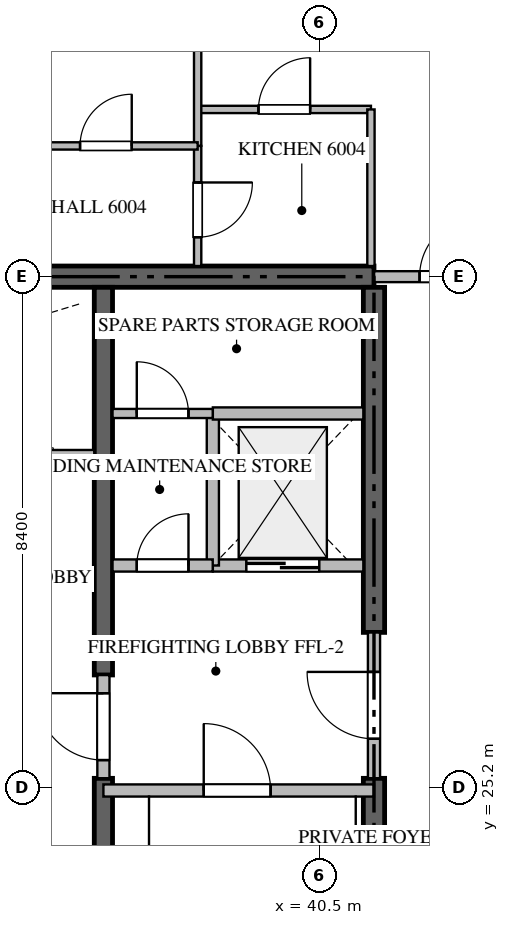
"""IFC4 building model, lengths in metres.
Left out: names, types, materials, properties, quantities, classifications, styles, units other than length and angle.
Written with IfcOpenShell. Run it as: python <this file> out.ifc"""

import sys

from ifc_helpers import new_model, si_unit, direction, frame, frame_2d, origin, place, context, subcontext, project, spatial, rectangle, extrude, source, transform, mapped, element, fill, save


model = new_model("IFC4")
c1 = context("Model", 3, precision=1e-05, world=origin(), true_north=direction((0.0, 1.0)))
c2 = subcontext(c1, "Body", "Model", "MODEL_VIEW")
j1 = project(units=[si_unit("LENGTHUNIT", "METRE"), si_unit("PLANEANGLEUNIT", "RADIAN")], contexts=[c1])
p1 = place(None, origin())
s1 = spatial("IfcSite", under=j1, at=p1, CompositionType="ELEMENT")
p2 = place(p1, origin())
s2 = spatial("IfcBuilding", under=s1, at=p2, CompositionType="ELEMENT")
p3 = place(p2, frame((0.0, 0.0, 241.25)))
s3 = spatial("IfcBuildingStorey", under=s2, at=p3, CompositionType="ELEMENT", Elevation=241.25)
p4 = place(p3, frame((41.4, 33.6, -0.26), z_axis=(0.0, 0.0, 1.0), x_axis=(-1.0, 0.0, 0.0)))
e1 = element("IfcWall", 1, at=p4, inside=s3, PredefinedType="SHEAR", context=c2, shape_type="SweptSolid", body=[
    extrude(rectangle(XDim=18.0, YDim=0.35, at=frame_2d((9.0, 0.0))), origin(), (0.0, 0.0, 1.0), 3.848),
])
p5 = place(p3, frame((41.4, 16.975, -0.26), z_axis=(0.0, 0.0, 1.0), x_axis=(0.0, 1.0, 0.0)))
e2 = element("IfcWall", 2, at=p5, inside=s3, PredefinedType="SHEAR", context=c2, shape_type="SweptSolid", body=[
    extrude(rectangle(XDim=8.375, YDim=0.35, at=frame_2d((4.188, 0.0))), origin(), (0.0, 0.0, 1.0), 3.848),
])
p6 = place(p3, frame((41.4, 27.75, -0.26), z_axis=(0.0, 0.0, 1.0), x_axis=(0.0, 1.0, 0.0)))
e3 = element("IfcWall", 3, at=p6, inside=s3, PredefinedType="SHEAR", context=c2, shape_type="SweptSolid", body=[
    extrude(rectangle(XDim=5.675, YDim=0.35, at=frame_2d((2.837, 0.0))), origin(), (0.0, 0.0, 1.0), 3.848),
])
p7 = place(p3, frame((36.95, 16.975, -0.26), z_axis=(0.0, 0.0, 1.0), x_axis=(0.0, 1.0, 0.0)))
e4 = element("IfcWall", 4, at=p7, inside=s3, PredefinedType="SHEAR", context=c2, shape_type="SweptSolid", body=[
    extrude(rectangle(XDim=8.375, YDim=0.3, at=frame_2d((4.188, 0.0))), origin(), (0.0, 0.0, 1.0), 3.848),
])
p8 = place(p3, frame((36.95, 27.05, -0.26), z_axis=(0.0, 0.0, 1.0), x_axis=(0.0, 1.0, 0.0)))
e5 = element("IfcWall", 5, at=p8, inside=s3, PredefinedType="SHEAR", context=c2, shape_type="SweptSolid", body=[
    extrude(rectangle(XDim=6.375, YDim=0.3, at=frame_2d((3.188, 0.0))), origin(), (0.0, 0.0, 1.0), 3.848),
])
p9 = place(p3, frame((36.95, 25.15, 0.0), z_axis=(0.0, 0.0, 1.0), x_axis=(1.0, 0.0, 0.0)))
e6 = element("IfcWall", 6, at=p9, inside=s3, PredefinedType="STANDARD", context=c2, shape_type="SweptSolid", body=[
    extrude(rectangle(XDim=4.45, YDim=0.2, at=frame_2d((2.225, 0.0))), origin(), (0.0, 0.0, 1.0), 3.59),
])
p10 = place(p9, frame((1.65, 0.0, 0.0)))
e7 = element("IfcOpeningElement", 7, at=p10, cuts=e6, PredefinedType="OPENING", context=c2, shape_type="SweptSolid", body=[
    extrude(rectangle(XDim=1.1, YDim=2.15, at=frame_2d((0.55, 1.075))), frame((0.0, 0.11, 0.0), z_axis=(0.0, -1.0, 0.0), x_axis=(1.0, 0.0, 0.0)), (0.0, 0.0, 1.0), 0.22),
])
p11 = place(p3, frame((38.75, 28.85, 0.0), z_axis=(0.0, 0.0, 1.0), x_axis=(1.0, 0.0, 0.0)))
e8 = element("IfcWall", 8, at=p11, inside=s3, PredefinedType="STANDARD", context=c2, shape_type="SweptSolid", body=[
    extrude(rectangle(XDim=2.475, YDim=0.2, at=frame_2d((1.238, 0.0))), origin(), (0.0, 0.0, 1.0), 3.59),
])
p12 = place(p11, frame((0.55, 0.0, 0.0)))
e9 = element("IfcOpeningElement", 9, at=p12, cuts=e8, PredefinedType="OPENING", context=c2, shape_type="SweptSolid", body=[
    extrude(rectangle(XDim=1.2, YDim=2.2, at=frame_2d((0.6, 1.1))), frame((0.0, 0.11, 0.0), z_axis=(0.0, -1.0, 0.0), x_axis=(1.0, 0.0, 0.0)), (0.0, 0.0, 1.0), 0.22),
])
p13 = place(p3, frame((35.0, 30.65, 0.0), z_axis=(0.0, 0.0, 1.0), x_axis=(1.0, 0.0, 0.0)))
e10 = element("IfcWall", 10, at=p13, inside=s3, PredefinedType="STANDARD", context=c2, shape_type="SweptSolid", body=[
    extrude(rectangle(XDim=1.8, YDim=0.2, at=frame_2d((0.9, 0.0))), origin(), (0.0, 0.0, 1.0), 3.59),
])
p14 = place(p3, frame((38.75, 28.85, 0.0), z_axis=(0.0, 0.0, 1.0), x_axis=(0.0, 1.0, 0.0)))
e11 = element("IfcWall", 11, at=p14, inside=s3, PredefinedType="STANDARD", context=c2, shape_type="SweptSolid", body=[
    extrude(rectangle(XDim=2.5, YDim=0.2, at=frame_2d((1.25, 0.0))), origin(), (0.0, 0.0, 1.0), 3.59),
])
p15 = place(p3, frame((38.75, 31.35, 0.0), z_axis=(0.0, 0.0, 1.0), x_axis=(1.0, 0.0, 0.0)))
e12 = element("IfcWall", 12, at=p15, inside=s3, PredefinedType="STANDARD", context=c2, shape_type="SweptSolid", body=[
    extrude(rectangle(XDim=2.475, YDim=0.2, at=frame_2d((1.238, 0.0))), origin(), (0.0, 0.0, 1.0), 3.59),
])
p16 = place(p3, frame((37.1, 28.85, 0.0), z_axis=(0.0, 0.0, 1.0), x_axis=(1.0, 0.0, 0.0)))
e13 = element("IfcWall", 13, at=p16, inside=s3, PredefinedType="STANDARD", context=c2, shape_type="SweptSolid", body=[
    extrude(rectangle(XDim=1.648, YDim=0.2, at=frame_2d((0.824, 0.0))), origin(), (0.0, 0.0, 1.0), 3.59),
])
p17 = place(p16, frame((0.399, 0.0, 0.0)))
e14 = element("IfcOpeningElement", 14, at=p17, cuts=e13, PredefinedType="OPENING", context=c2, shape_type="SweptSolid", body=[
    extrude(rectangle(XDim=0.85, YDim=2.1, at=frame_2d((0.425, 1.05))), frame((0.0, 0.11, 0.0), z_axis=(0.0, -1.0, 0.0), x_axis=(1.0, 0.0, 0.0)), (0.0, 0.0, 1.0), 0.22),
])
p18 = place(p3, frame((41.4, 25.352, 0.0), z_axis=(0.0, 0.0, 1.0), x_axis=(0.0, 1.0, 0.0)))
e15 = element("IfcWall", 15, at=p18, inside=s3, PredefinedType="STANDARD", context=c2, shape_type="SweptSolid", body=[
    extrude(rectangle(XDim=2.396, YDim=0.2, at=frame_2d((1.198, 0.0))), origin(), (0.0, 0.0, 1.0), 3.59),
])
p19 = place(p18, frame((0.648, 0.0, 0.0)))
e16 = element("IfcOpeningElement", 16, at=p19, cuts=e15, PredefinedType="OPENING", context=c2, shape_type="SweptSolid", body=[
    extrude(rectangle(XDim=1.1, YDim=2.15, at=frame_2d((0.55, 1.075))), frame((0.0, 0.11, 0.0), z_axis=(0.0, -1.0, 0.0), x_axis=(1.0, 0.0, 0.0)), (0.0, 0.0, 1.0), 0.22),
])
p20 = place(p3, frame((36.95, 25.352, 0.0), z_axis=(0.0, 0.0, 1.0), x_axis=(0.0, 1.0, 0.0)))
e17 = element("IfcWall", 17, at=p20, inside=s3, PredefinedType="STANDARD", context=c2, shape_type="SweptSolid", body=[
    extrude(rectangle(XDim=1.696, YDim=0.2, at=frame_2d((0.848, 0.0))), origin(), (0.0, 0.0, 1.0), 3.59),
])
p21 = place(p20, frame((0.298, 0.0, 0.0)))
e18 = element("IfcOpeningElement", 18, at=p21, cuts=e17, PredefinedType="OPENING", context=c2, shape_type="SweptSolid", body=[
    extrude(rectangle(XDim=1.1, YDim=2.15, at=frame_2d((0.55, 1.075))), frame((0.0, 0.11, 0.0), z_axis=(0.0, -1.0, 0.0), x_axis=(1.0, 0.0, 0.0)), (0.0, 0.0, 1.0), 0.22),
])
p22 = place(p3, frame((37.1, 31.35, 0.0), z_axis=(0.0, 0.0, 1.0), x_axis=(1.0, 0.0, 0.0)))
e19 = element("IfcWall", 19, at=p22, inside=s3, PredefinedType="PARTITIONING", context=c2, shape_type="SweptSolid", body=[
    extrude(rectangle(XDim=1.648, YDim=0.15, at=frame_2d((0.824, 0.0))), origin(), (0.0, 0.0, 1.0), 3.59),
])
p23 = place(p22, frame((0.399, 0.0, 0.0)))
e20 = element("IfcOpeningElement", 20, at=p23, cuts=e19, PredefinedType="OPENING", context=c2, shape_type="SweptSolid", body=[
    extrude(rectangle(XDim=0.85, YDim=2.1, at=frame_2d((0.425, 1.05))), frame((0.0, 0.085, 0.0), z_axis=(0.0, -1.0, 0.0), x_axis=(1.0, 0.0, 0.0)), (0.0, 0.0, 1.0), 0.17),
])
p24 = place(p3, frame((41.402, 33.6, 0.0), z_axis=(0.0, 0.0, 1.0), x_axis=(1.0, 0.0, 0.0)))
e21 = element("IfcWall", 21, at=p24, inside=s3, PredefinedType="PARTITIONING", context=c2, shape_type="SweptSolid", body=[
    extrude(rectangle(XDim=2.496, YDim=0.18, at=frame_2d((1.248, 0.0))), origin(), (0.0, 0.0, 1.0), 3.59),
])
p25 = place(p24, frame((0.748, 0.0, 0.0)))
e22 = element("IfcOpeningElement", 22, at=p25, cuts=e21, PredefinedType="OPENING", context=c2, shape_type="SweptSolid", body=[
    extrude(rectangle(XDim=1.0, YDim=2.15, at=frame_2d((0.5, 1.075))), frame((0.0, 0.1, 0.0), z_axis=(0.0, -1.0, 0.0), x_axis=(1.0, 0.0, 0.0)), (0.0, 0.0, 1.0), 0.2),
])
p26 = place(p3, frame((38.5, 36.35, 0.0), z_axis=(0.0, 0.0, 1.0), x_axis=(1.0, 0.0, 0.0)))
e23 = element("IfcWall", 23, at=p26, inside=s3, PredefinedType="PARTITIONING", context=c2, shape_type="SweptSolid", body=[
    extrude(rectangle(XDim=2.85, YDim=0.12, at=frame_2d((1.425, 0.0))), origin(), (0.0, 0.0, 1.0), 3.59),
])
p27 = place(p26, frame((1.0, 0.0, 0.0)))
e24 = element("IfcOpeningElement", 24, at=p27, cuts=e23, PredefinedType="OPENING", context=c2, shape_type="SweptSolid", body=[
    extrude(rectangle(XDim=0.85, YDim=2.1, at=frame_2d((0.425, 1.05))), frame((0.0, 0.07, 0.0), z_axis=(0.0, -1.0, 0.0), x_axis=(1.0, 0.0, 0.0)), (0.0, 0.0, 1.0), 0.14),
])
p28 = place(p3, frame((41.35, 36.35, 0.0), z_axis=(0.0, 0.0, 1.0), x_axis=(0.0, -1.0, 0.0)))
e25 = element("IfcWall", 25, at=p28, inside=s3, PredefinedType="PARTITIONING", context=c2, shape_type="SweptSolid", body=[
    extrude(rectangle(XDim=2.575, YDim=0.12, at=frame_2d((1.288, 0.0))), origin(), (0.0, 0.0, 1.0), 3.59),
])
p29 = place(p3, frame((38.5, 35.75, 0.0), z_axis=(0.0, 0.0, 1.0), x_axis=(0.0, -1.0, 0.0)))
e26 = element("IfcWall", 26, at=p29, inside=s3, PredefinedType="PARTITIONING", context=c2, shape_type="SweptSolid", body=[
    extrude(rectangle(XDim=1.975, YDim=0.12, at=frame_2d((0.988, 0.0))), origin(), (0.0, 0.0, 1.0), 3.59),
])
p30 = place(p29, frame((0.601, 0.0, 0.0)))
e27 = element("IfcOpeningElement", 27, at=p30, cuts=e26, PredefinedType="OPENING", context=c2, shape_type="SweptSolid", body=[
    extrude(rectangle(XDim=0.9, YDim=2.1, at=frame_2d((0.45, 1.05))), frame((0.0, 0.07, 0.0), z_axis=(0.0, -1.0, 0.0), x_axis=(1.0, 0.0, 0.0)), (0.0, 0.0, 1.0), 0.14),
])
p31 = place(p3, frame((38.5, 42.499, 0.0), z_axis=(0.0, 0.0, 1.0), x_axis=(0.0, -1.0, 0.0)))
e28 = element("IfcWall", 28, at=p31, inside=s3, PredefinedType="PARTITIONING", context=c2, shape_type="SweptSolid", body=[
    extrude(rectangle(XDim=6.747, YDim=0.12, at=frame_2d((3.374, 0.0))), origin(), (0.0, 0.0, 1.0), 3.59),
])
p32 = place(p3, frame((35.482, 35.75, 0.0), z_axis=(0.0, 0.0, 1.0), x_axis=(1.0, 0.0, 0.0)))
e29 = element("IfcWall", 29, at=p32, inside=s3, PredefinedType="PARTITIONING", context=c2, shape_type="SweptSolid", body=[
    extrude(rectangle(XDim=3.018, YDim=0.12, at=frame_2d((1.509, 0.0))), origin(), (0.0, 0.0, 1.0), 3.59),
])
p33 = place(p32, frame((1.084, 0.0, 0.0)))
e30 = element("IfcOpeningElement", 30, at=p33, cuts=e29, PredefinedType="OPENING", context=c2, shape_type="SweptSolid", body=[
    extrude(rectangle(XDim=0.85, YDim=2.1, at=frame_2d((0.425, 1.05))), frame((0.0, 0.07, 0.0), z_axis=(0.0, -1.0, 0.0), x_axis=(1.0, 0.0, 0.0)), (0.0, 0.0, 1.0), 0.14),
])
m1 = source(origin(), c2, "Body", "SweptSolid", [
    extrude(rectangle(XDim=1.1, YDim=2.15, at=frame_2d((0.55, 1.075))), frame((0.0, 0.025, 0.0), z_axis=(0.0, -1.0, 0.0), x_axis=(1.0, 0.0, 0.0)), (0.0, 0.0, 1.0), 0.05),
])
p34 = place(p10, origin())
e31 = element("IfcDoor", 31, at=p34, inside=s3, OperationType="SINGLE_SWING_LEFT", PredefinedType="DOOR", context=c2, shape_type="MappedRepresentation", body=[
    mapped(m1, transform((0.0, 0.0, 0.0), scale=1.0)),
])
fill(e7, e31)
m2 = source(origin(), c2, "Body", "SweptSolid", [
    extrude(rectangle(XDim=1.2, YDim=2.2, at=frame_2d((0.6, 1.1))), frame((0.0, 0.025, 0.0), z_axis=(0.0, -1.0, 0.0), x_axis=(1.0, 0.0, 0.0)), (0.0, 0.0, 1.0), 0.05),
])
p35 = place(p12, origin())
e32 = element("IfcDoor", 32, at=p35, inside=s3, OperationType="DOUBLE_DOOR_SLIDING", PredefinedType="DOOR", context=c2, shape_type="MappedRepresentation", body=[
    mapped(m2, transform((0.0, 0.0, 0.0), scale=1.0)),
])
fill(e9, e32)
m3 = source(origin(), c2, "Body", "SweptSolid", [
    extrude(rectangle(XDim=0.85, YDim=2.1, at=frame_2d((0.425, 1.05))), frame((0.0, 0.025, 0.0), z_axis=(0.0, -1.0, 0.0), x_axis=(1.0, 0.0, 0.0)), (0.0, 0.0, 1.0), 0.05),
])
p36 = place(p17, origin())
e33 = element("IfcDoor", 33, at=p36, inside=s3, OperationType="SINGLE_SWING_RIGHT", PredefinedType="DOOR", context=c2, shape_type="MappedRepresentation", body=[
    mapped(m3, transform((0.0, 0.0, 0.0), scale=1.0)),
])
fill(e14, e33)
p37 = place(p19, origin())
e34 = element("IfcDoor", 34, at=p37, inside=s3, OperationType="SINGLE_SWING_RIGHT", PredefinedType="DOOR", context=c2, shape_type="MappedRepresentation", body=[
    mapped(m1, transform((0.0, 0.0, 0.0), scale=1.0)),
])
fill(e16, e34)
p38 = place(p21, origin())
e35 = element("IfcDoor", 35, at=p38, inside=s3, OperationType="SINGLE_SWING_RIGHT", PredefinedType="DOOR", context=c2, shape_type="MappedRepresentation", body=[
    mapped(m1, transform((0.0, 0.0, 0.0), scale=1.0)),
])
fill(e18, e35)
p39 = place(p23, origin())
e36 = element("IfcDoor", 36, at=p39, inside=s3, OperationType="SINGLE_SWING_LEFT", PredefinedType="DOOR", context=c2, shape_type="MappedRepresentation", body=[
    mapped(m3, transform((0.0, 0.0, 0.0), scale=1.0)),
])
fill(e20, e36)
m4 = source(origin(), c2, "Body", "SweptSolid", [
    extrude(rectangle(XDim=1.0, YDim=2.15, at=frame_2d((0.5, 1.075))), frame((0.0, 0.025, 0.0), z_axis=(0.0, -1.0, 0.0), x_axis=(1.0, 0.0, 0.0)), (0.0, 0.0, 1.0), 0.05),
])
p40 = place(p25, origin())
e37 = element("IfcDoor", 37, at=p40, inside=s3, OperationType="SINGLE_SWING_RIGHT", PredefinedType="DOOR", context=c2, shape_type="MappedRepresentation", body=[
    mapped(m4, transform((0.0, 0.0, 0.0), scale=1.0)),
])
fill(e22, e37)
p41 = place(p27, origin())
e38 = element("IfcDoor", 38, at=p41, inside=s3, OperationType="SINGLE_SWING_RIGHT", PredefinedType="DOOR", context=c2, shape_type="MappedRepresentation", body=[
    mapped(m3, transform((0.0, 0.0, 0.0), scale=1.0)),
])
fill(e24, e38)
m5 = source(origin(), c2, "Body", "SweptSolid", [
    extrude(rectangle(XDim=0.9, YDim=2.1, at=frame_2d((0.45, 1.05))), frame((0.0, 0.025, 0.0), z_axis=(0.0, -1.0, 0.0), x_axis=(1.0, 0.0, 0.0)), (0.0, 0.0, 1.0), 0.05),
])
p42 = place(p30, origin())
e39 = element("IfcDoor", 39, at=p42, inside=s3, OperationType="SINGLE_SWING_LEFT", PredefinedType="DOOR", context=c2, shape_type="MappedRepresentation", body=[
    mapped(m5, transform((0.0, 0.0, 0.0), scale=1.0)),
])
fill(e27, e39)
p43 = place(p33, origin())
e40 = element("IfcDoor", 40, at=p43, inside=s3, OperationType="SINGLE_SWING_RIGHT", PredefinedType="DOOR", context=c2, shape_type="MappedRepresentation", body=[
    mapped(m3, transform((0.0, 0.0, 0.0), scale=1.0)),
])
fill(e30, e40)
save(model, sys.argv[1])
